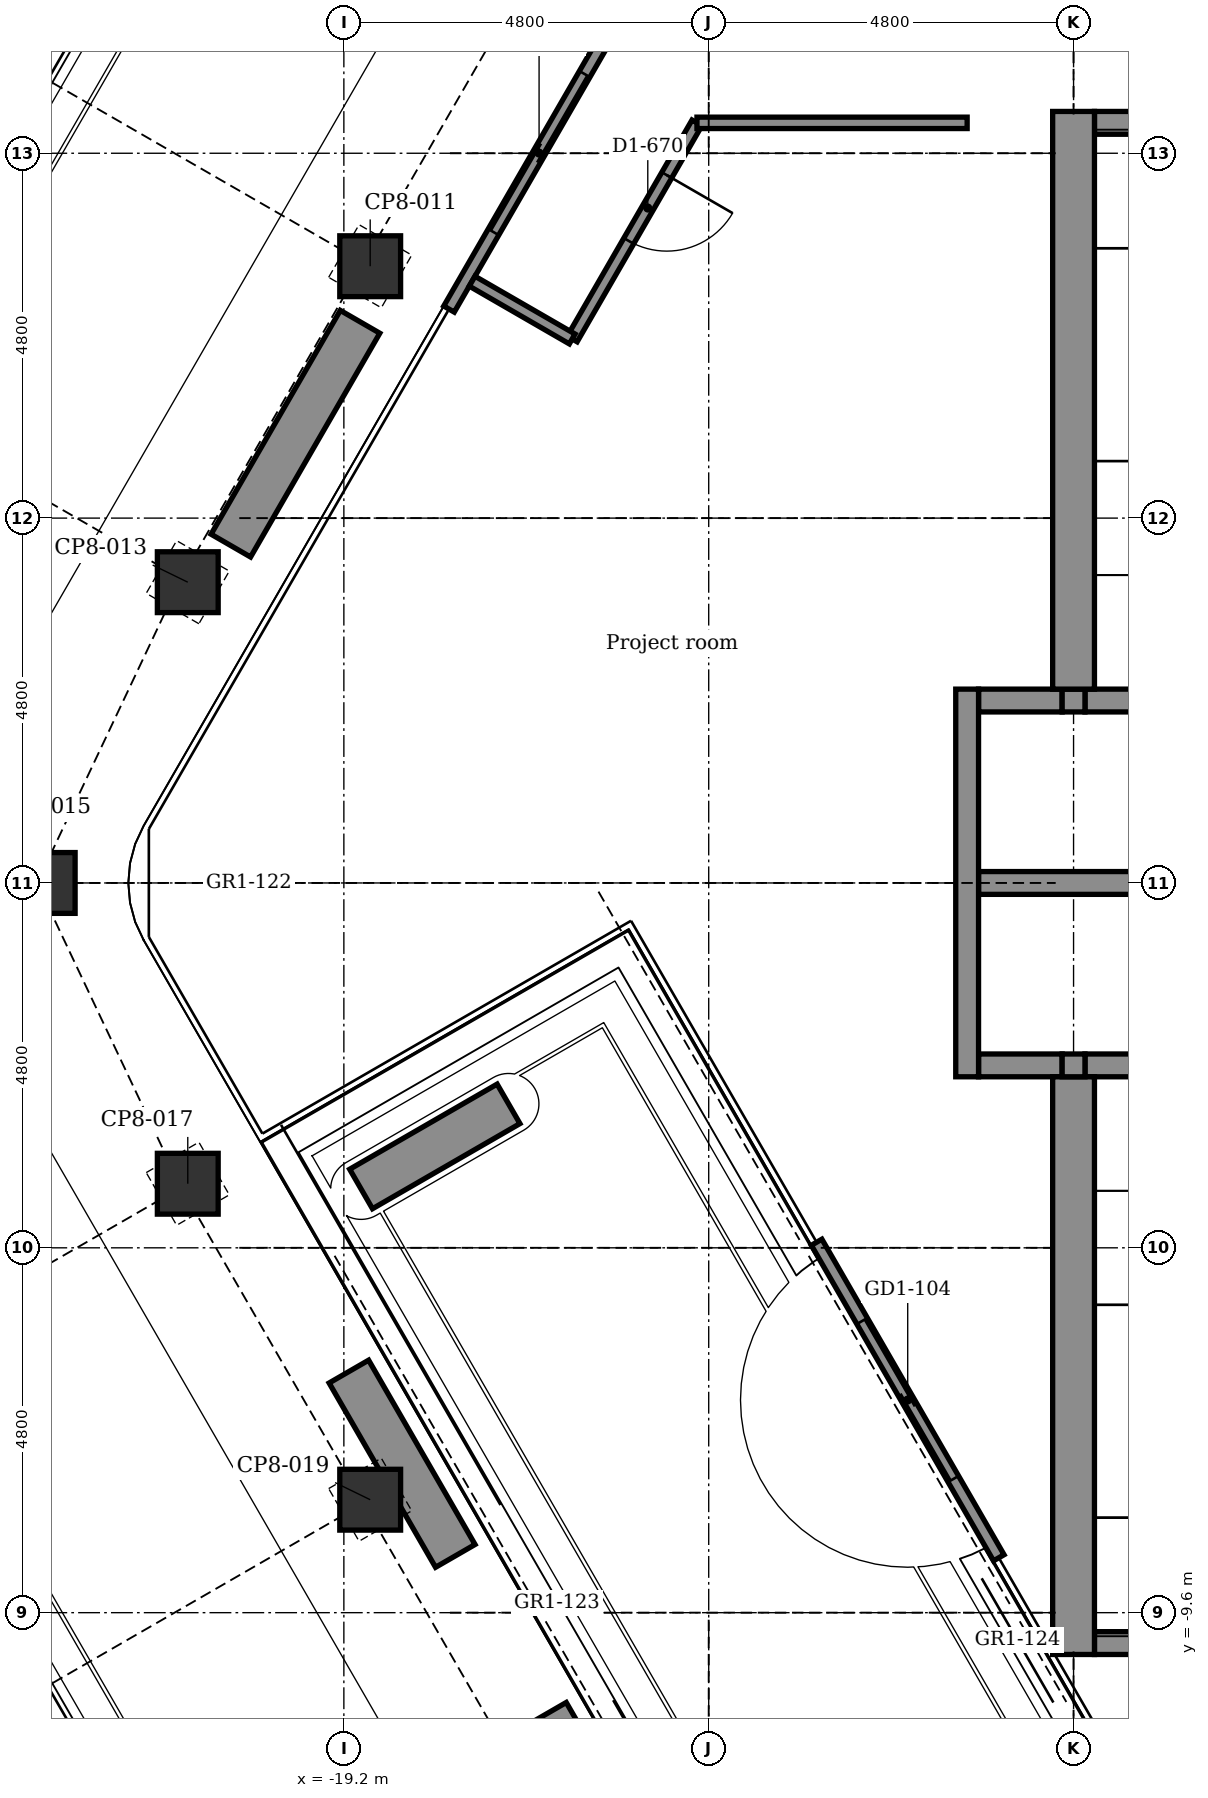
"""IFC4 building model, lengths in metres.
Left out: names, types, materials, properties, quantities, classifications, styles, units other than length and angle.
Written with IfcOpenShell. Run it as: python <this file> out.ifc"""

import sys

from ifc_helpers import new_model, si_unit, direction, frame, frame_2d, origin, origin_2d, place, context, subcontext, project, spatial, rectangle, extrude, element, fill, save


model = new_model("IFC4")
c1 = context("Model", 3, precision=1e-05, world=origin(), true_north=direction((0.0, 1.0)))
c2 = subcontext(c1, "Body", "Model", "MODEL_VIEW")
j1 = project(units=[si_unit("LENGTHUNIT", "METRE"), si_unit("PLANEANGLEUNIT", "RADIAN")], contexts=[c1])
p1 = place(None, origin())
s1 = spatial("IfcSite", under=j1, at=p1, CompositionType="ELEMENT")
p2 = place(p1, origin())
s2 = spatial("IfcBuilding", under=s1, at=p2, CompositionType="ELEMENT")
p3 = place(p2, frame((0.0, 0.0, 238.4)))
s3 = spatial("IfcBuildingStorey", under=s2, at=p3, CompositionType="ELEMENT", Elevation=238.4)
for number, where, z_axis, x_axis in (
    (1, (-18.854, -8.114, -0.15), (0.0, 0.0, 1.0), (0.866, 0.5, 0.0)),
    (2, (-21.254, -3.957, -0.15), (0.0, 0.0, 1.0), (0.866, 0.5, 0.0)),
    (3, (-23.136, 0.0, -0.15), (0.0, 0.0, 1.0), (1.0, 0.0, 0.0)),
    (4, (-21.254, 3.957, -0.15), (0.0, 0.0, 1.0), (0.5, 0.866, 0.0)),
    (5, (-18.854, 8.114, -0.15), (0.0, 0.0, 1.0), (0.5, 0.866, 0.0)),
):
    element("IfcColumn", number, at=place(p3, frame(where, z_axis=z_axis, x_axis=x_axis)), inside=s3, PredefinedType="COLUMN", context=c2, shape_type="SweptSolid", body=[
        extrude(rectangle(XDim=0.8, YDim=0.8, at=origin_2d()), origin(), (0.0, 0.0, 1.0), 3.9),
    ])
p4 = place(p3, frame((-9.325, -10.0, -0.15), z_axis=(0.0, 0.0, 1.0), x_axis=(1.0, 0.0, 0.0)))
e6 = element("IfcWall", 6, at=p4, inside=s3, PredefinedType="STANDARD", context=c2, shape_type="SweptSolid", body=[
    extrude(rectangle(XDim=4.075, YDim=0.3, at=frame_2d((2.038, 0.0))), origin(), (0.0, 0.0, 1.0), 3.9),
])
p5 = place(p3, frame((-10.85, -2.4, -0.15), z_axis=(0.0, 0.0, 1.0), x_axis=(1.0, 0.0, 0.0)))
e7 = element("IfcWall", 7, at=p5, inside=s3, PredefinedType="STANDARD", context=c2, shape_type="SweptSolid", body=[
    extrude(rectangle(XDim=1.1, YDim=0.3, at=frame_2d((0.55, 0.0))), origin(), (0.0, 0.0, 1.0), 3.9),
])
p6 = place(p3, frame((-9.45, -2.4, -0.15), z_axis=(0.0, 0.0, 1.0), x_axis=(1.0, 0.0, 0.0)))
e8 = element("IfcWall", 8, at=p6, inside=s3, PredefinedType="STANDARD", context=c2, shape_type="SweptSolid", body=[
    extrude(rectangle(XDim=1.9, YDim=0.3, at=frame_2d((0.95, 0.0))), origin(), (0.0, 0.0, 1.0), 3.9),
])
p7 = place(p3, frame((-10.85, 0.0, -0.15), z_axis=(0.0, 0.0, 1.0), x_axis=(1.0, 0.0, 0.0)))
e9 = element("IfcWall", 9, at=p7, inside=s3, PredefinedType="STANDARD", context=c2, shape_type="SweptSolid", body=[
    extrude(rectangle(XDim=3.3, YDim=0.3, at=frame_2d((1.65, 0.0))), origin(), (0.0, 0.0, 1.0), 3.9),
])
p8 = place(p3, frame((-10.85, 2.4, -0.15), z_axis=(0.0, 0.0, 1.0), x_axis=(1.0, 0.0, 0.0)))
e10 = element("IfcWall", 10, at=p8, inside=s3, PredefinedType="STANDARD", context=c2, shape_type="SweptSolid", body=[
    extrude(rectangle(XDim=1.1, YDim=0.3, at=frame_2d((0.55, 0.0))), origin(), (0.0, 0.0, 1.0), 3.9),
])
p9 = place(p3, frame((-9.45, 2.4, -0.15), z_axis=(0.0, 0.0, 1.0), x_axis=(1.0, 0.0, 0.0)))
e11 = element("IfcWall", 11, at=p9, inside=s3, PredefinedType="STANDARD", context=c2, shape_type="SweptSolid", body=[
    extrude(rectangle(XDim=1.9, YDim=0.3, at=frame_2d((0.95, 0.0))), origin(), (0.0, 0.0, 1.0), 3.9),
])
p10 = place(p3, frame((-9.325, 10.0, -0.15), z_axis=(0.0, 0.0, 1.0), x_axis=(1.0, 0.0, 0.0)))
e12 = element("IfcWall", 12, at=p10, inside=s3, PredefinedType="STANDARD", context=c2, shape_type="SweptSolid", body=[
    extrude(rectangle(XDim=4.075, YDim=0.3, at=frame_2d((2.038, 0.0))), origin(), (0.0, 0.0, 1.0), 3.9),
])
p11 = place(p3, frame((-11.0, -2.55, -0.15), z_axis=(0.0, 0.0, 1.0), x_axis=(0.0, 1.0, 0.0)))
e13 = element("IfcWall", 13, at=p11, inside=s3, PredefinedType="STANDARD", context=c2, shape_type="SweptSolid", body=[
    extrude(rectangle(XDim=5.1, YDim=0.3, at=frame_2d((2.55, 0.0))), origin(), (0.0, 0.0, 1.0), 3.9),
])
p12 = place(p3, frame((-9.6, -10.15, -0.15), z_axis=(0.0, 0.0, 1.0), x_axis=(0.0, 1.0, 0.0)))
e14 = element("IfcWall", 14, at=p12, inside=s3, PredefinedType="SHEAR", context=c2, shape_type="SweptSolid", body=[
    extrude(rectangle(XDim=7.6, YDim=0.55, at=frame_2d((3.8, 0.0))), origin(), (0.0, 0.0, 1.0), 3.9),
])
for number, where, z_axis, x_axis in (
    (15, (-9.6, -2.55, -0.15), (0.0, 0.0, 1.0), (0.0, 1.0, 0.0)),
    (16, (-9.6, 2.25, -0.15), (0.0, 0.0, 1.0), (0.0, 1.0, 0.0)),
):
    element("IfcWall", number, at=place(p3, frame(where, z_axis=z_axis, x_axis=x_axis)), inside=s3, PredefinedType="STANDARD", context=c2, shape_type="SweptSolid", body=[
        extrude(rectangle(XDim=0.3, YDim=0.3, at=frame_2d((0.15, 0.0))), origin(), (0.0, 0.0, 1.0), 3.9),
    ])
p13 = place(p3, frame((-9.6, 2.55, -0.15), z_axis=(0.0, 0.0, 1.0), x_axis=(0.0, 1.0, 0.0)))
e17 = element("IfcWall", 17, at=p13, inside=s3, PredefinedType="SHEAR", context=c2, shape_type="SweptSolid", body=[
    extrude(rectangle(XDim=7.6, YDim=0.55, at=frame_2d((3.8, 0.0))), origin(), (0.0, 0.0, 1.0), 3.9),
])
p14 = place(p3, frame((-10.583, -8.878, 0.0), z_axis=(0.0, 0.0, 1.0), x_axis=(-0.500011970786, 0.866018492338, 0.0)))
e18 = element("IfcWall", 18, at=p14, inside=s3, PredefinedType="PARTITIONING", context=c2, shape_type="SweptSolid", body=[
    extrude(rectangle(XDim=4.793, YDim=0.16, at=frame_2d((2.397, 0.0))), origin(), (0.0, 0.0, 1.0), 3.75),
])
p15 = place(p14, frame((1.197, 0.0, 0.0)))
e19 = element("IfcOpeningElement", 19, at=p15, cuts=e18, PredefinedType="OPENING", context=c2, shape_type="SweptSolid", body=[
    extrude(rectangle(XDim=2.4, YDim=2.4, at=frame_2d((1.2, 1.2))), frame((0.0, 0.09, 0.0), z_axis=(0.0, -1.0, 0.0), x_axis=(1.0, 0.0, 0.0)), (0.0, 0.0, 1.0), 0.18),
])
p16 = place(p3, frame((-17.817, 7.55, 0.0), z_axis=(0.0, 0.0, 1.0), x_axis=(0.499978080042, 0.866038058908, 0.0)))
e20 = element("IfcWall", 20, at=p16, inside=s3, PredefinedType="PARTITIONING", context=c2, shape_type="SweptSolid", body=[
    extrude(rectangle(XDim=4.74, YDim=0.16, at=frame_2d((2.37, 0.0))), origin(), (0.0, 0.0, 1.0), 3.75),
])
p17 = place(p16, frame((1.17, 0.0, 0.0)))
e21 = element("IfcOpeningElement", 21, at=p17, cuts=e20, PredefinedType="OPENING", context=c2, shape_type="SweptSolid", body=[
    extrude(rectangle(XDim=2.4, YDim=2.4, at=frame_2d((1.2, 1.2))), frame((0.0, 0.09, 0.0), z_axis=(0.0, -1.0, 0.0), x_axis=(1.0, 0.0, 0.0)), (0.0, 0.0, 1.0), 0.18),
])
p18 = place(p3, frame((-20.687, 4.438, 0.0), z_axis=(0.0, 0.0, 1.0), x_axis=(0.500008388397, 0.866020560687, 0.0)))
e22 = element("IfcWall", 22, at=p18, inside=s3, PredefinedType="USERDEFINED", context=c2, shape_type="SweptSolid", body=[
    extrude(rectangle(XDim=3.4, YDim=0.6, at=frame_2d((1.7, 0.0))), origin(), (0.0, 0.0, 1.0), 0.7),
])
p19 = place(p3, frame((-17.034, -2.906, 0.0), z_axis=(0.0, 0.0, 1.0), x_axis=(-0.866027664105, -0.49999608499, 0.0)))
e23 = element("IfcWall", 23, at=p19, inside=s3, PredefinedType="USERDEFINED", context=c2, shape_type="SweptSolid", body=[
    extrude(rectangle(XDim=2.24, YDim=0.6, at=frame_2d((1.12, 0.0))), origin(), (0.0, 0.0, 1.0), 0.7),
])
p20 = place(p3, frame((-16.534, -10.932, 0.0), z_axis=(0.0, 0.0, 1.0), x_axis=(0.49998411664, -0.866034573852, 0.0)))
e24 = element("IfcWall", 24, at=p20, inside=s3, PredefinedType="USERDEFINED", context=c2, shape_type="SweptSolid", body=[
    extrude(rectangle(XDim=2.8, YDim=0.6, at=frame_2d((1.4, 0.0))), origin(), (0.0, 0.0, 1.0), 0.7),
])
p21 = place(p3, frame((-17.734, -8.853, 0.0), z_axis=(0.0, 0.0, 1.0), x_axis=(-0.500049511043, 0.865996816683, 0.0)))
e25 = element("IfcWall", 25, at=p21, inside=s3, PredefinedType="USERDEFINED", context=c2, shape_type="SweptSolid", body=[
    extrude(rectangle(XDim=2.8, YDim=0.6, at=frame_2d((1.4, 0.0))), origin(), (0.0, 0.0, 1.0), 0.7),
])
p22 = place(p3, frame((-16.196, 7.157, 0.0), z_axis=(0.0, 0.0, 1.0), x_axis=(0.499954196102, 0.866051847062, 0.0)))
e26 = element("IfcWall", 26, at=p22, inside=s3, PredefinedType="PARTITIONING", context=c2, shape_type="SweptSolid", body=[
    extrude(rectangle(XDim=3.283, YDim=0.15, at=frame_2d((1.642, 0.0))), origin(), (0.0, 0.0, 1.0), 3.75),
])
p23 = place(p22, frame((1.489, 0.0, 0.0)))
e27 = element("IfcOpeningElement", 27, at=p23, cuts=e26, PredefinedType="OPENING", context=c2, shape_type="SweptSolid", body=[
    extrude(rectangle(XDim=1.0, YDim=2.1, at=frame_2d((0.5, 1.05))), frame((0.0, 0.085, 0.0), z_axis=(0.0, -1.0, 0.0), x_axis=(1.0, 0.0, 0.0)), (0.0, 0.0, 1.0), 0.17),
])
p24 = place(p3, frame((-17.512, 7.917, 0.0), z_axis=(0.0, 0.0, 1.0), x_axis=(0.865960906633, -0.500111695708, 0.0)))
e28 = element("IfcWall", 28, at=p24, inside=s3, PredefinedType="PARTITIONING", context=c2, shape_type="SweptSolid", body=[
    extrude(rectangle(XDim=1.52, YDim=0.15, at=frame_2d((0.76, 0.0))), origin(), (0.0, 0.0, 1.0), 3.75),
])
p25 = place(p3, frame((-14.555, 10.0, 0.0), z_axis=(0.0, 0.0, 1.0), x_axis=(1.0, 0.0, 0.0)))
e29 = element("IfcWall", 29, at=p25, inside=s3, PredefinedType="PARTITIONING", context=c2, shape_type="SweptSolid", body=[
    extrude(rectangle(XDim=3.555, YDim=0.15, at=frame_2d((1.777, 0.0))), origin(), (0.0, 0.0, 1.0), 3.75),
])
p26 = place(p15, origin())
e30 = element("IfcDoor", 30, at=p26, inside=s3, OperationType="DOUBLE_DOOR_SLIDING", PredefinedType="DOOR", context=c2, shape_type="SweptSolid", body=[
    extrude(rectangle(XDim=2.4, YDim=2.4, at=frame_2d((1.2, 1.2))), frame((0.0, 0.025, 0.0), z_axis=(0.0, -1.0, 0.0), x_axis=(1.0, 0.0, 0.0)), (0.0, 0.0, 1.0), 0.05),
])
fill(e19, e30)
p27 = place(p17, origin())
e31 = element("IfcDoor", 31, at=p27, inside=s3, OperationType="DOUBLE_DOOR_SLIDING", PredefinedType="DOOR", context=c2, shape_type="SweptSolid", body=[
    extrude(rectangle(XDim=2.4, YDim=2.4, at=frame_2d((1.2, 1.2))), frame((0.0, 0.025, 0.0), z_axis=(0.0, -1.0, 0.0), x_axis=(1.0, 0.0, 0.0)), (0.0, 0.0, 1.0), 0.05),
])
fill(e21, e31)
p28 = place(p23, frame((1.0, 0.0, 0.0), z_axis=(0.0, 0.0, 1.0), x_axis=(-1.0, 0.0, 0.0)))
e32 = element("IfcDoor", 32, at=p28, inside=s3, OperationType="SINGLE_SWING_RIGHT", PredefinedType="DOOR", context=c2, shape_type="SweptSolid", body=[
    extrude(rectangle(XDim=1.0, YDim=2.1, at=frame_2d((0.5, 1.05))), frame((0.0, 0.025, 0.0), z_axis=(0.0, -1.0, 0.0), x_axis=(1.0, 0.0, 0.0)), (0.0, 0.0, 1.0), 0.05),
])
fill(e27, e32)
save(model, sys.argv[1])
